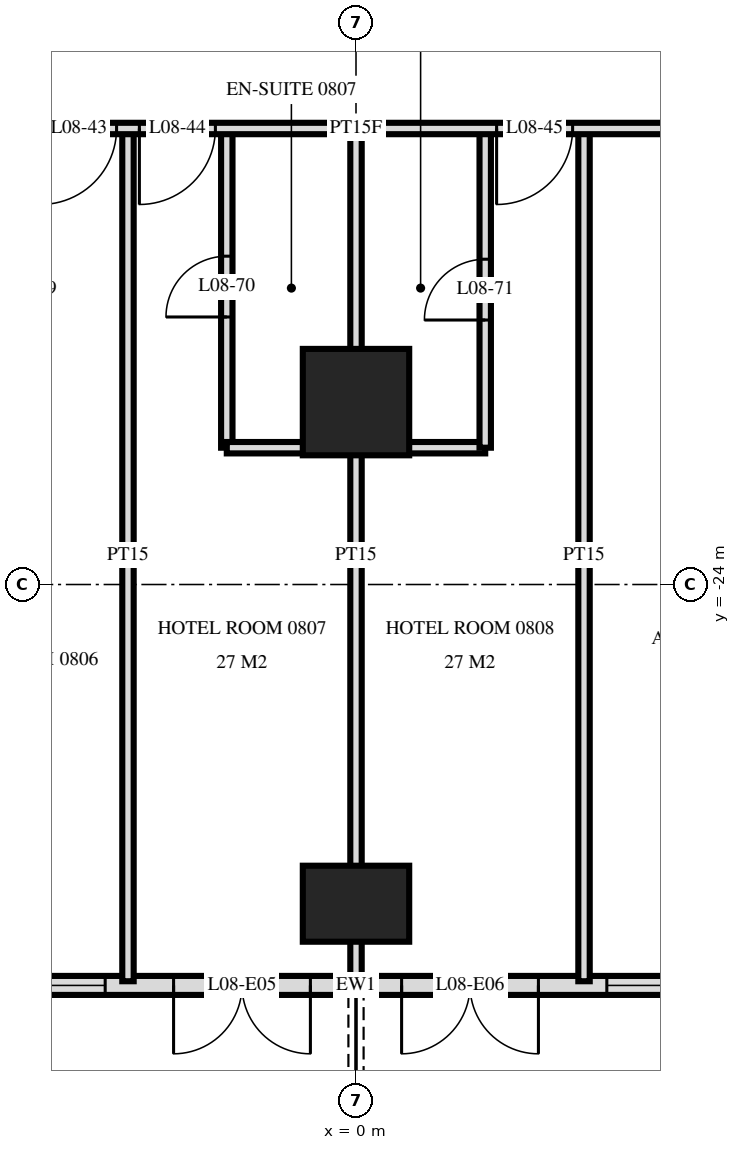
"""IFC4 building model, lengths in metres.
Left out: names, types, materials, properties, quantities, classifications, styles, units other than length and angle.
Written with IfcOpenShell. Run it as: python <this file> out.ifc"""

import sys

from ifc_helpers import new_model, si_unit, direction, frame, frame_2d, origin, origin_2d, place, context, subcontext, project, spatial, rectangle, extrude, element, fill, save


model = new_model("IFC4")
c1 = context("Model", 3, precision=1e-05, world=origin(), true_north=direction((0.0, 1.0)))
c2 = subcontext(c1, "Body", "Model", "MODEL_VIEW")
j1 = project(units=[si_unit("LENGTHUNIT", "METRE"), si_unit("PLANEANGLEUNIT", "RADIAN")], contexts=[c1])
p1 = place(None, origin())
s1 = spatial("IfcSite", under=j1, at=p1, CompositionType="ELEMENT")
p2 = place(p1, origin())
s2 = spatial("IfcBuilding", under=s1, at=p2, CompositionType="ELEMENT")
p3 = place(p2, frame((0.0, 0.0, 38.4)))
s3 = spatial("IfcBuildingStorey", under=s2, at=p3, CompositionType="ELEMENT", Elevation=38.4)
p4 = place(p3, frame((0.0, -28.2, 0.0), z_axis=(0.0, 0.0, 1.0), x_axis=(1.0, 0.0, 0.0)))
e1 = element("IfcColumn", 1, at=p4, inside=s3, PredefinedType="COLUMN", context=c2, shape_type="SweptSolid", body=[
    extrude(rectangle(XDim=1.4, YDim=1.0, at=origin_2d()), origin(), (0.0, 0.0, 1.0), 3.6),
])
p5 = place(p3, frame((0.0, -21.6, 0.0), z_axis=(0.0, 0.0, 1.0), x_axis=(1.0, 0.0, 0.0)))
e2 = element("IfcColumn", 2, at=p5, inside=s3, PredefinedType="COLUMN", context=c2, shape_type="SweptSolid", body=[
    extrude(rectangle(XDim=1.4, YDim=1.4, at=origin_2d()), origin(), (0.0, 0.0, 1.0), 3.6),
])
p6 = place(p3, frame((-28.775, -29.275, 0.0), z_axis=(0.0, 0.0, 1.0), x_axis=(1.0, 0.0, 0.0)))
e3 = element("IfcWall", 3, at=p6, inside=s3, PredefinedType="SOLIDWALL", context=c2, shape_type="SweptSolid", body=[
    extrude(rectangle(XDim=57.551, YDim=0.25, at=frame_2d((28.775, 0.0))), origin(), (0.0, 0.0, 1.0), 3.32),
])
p7 = place(p6, frame((0.575, 0.0, 0.0)))
e4 = element("IfcOpeningElement", 4, at=p7, cuts=e3, PredefinedType="OPENING", context=c2, shape_type="SweptSolid", body=[
    extrude(rectangle(XDim=1.8, YDim=2.4, at=frame_2d((0.9, 1.2))), frame((0.0, 0.135, 0.0), z_axis=(0.0, -1.0, 0.0), x_axis=(1.0, 0.0, 0.0)), (0.0, 0.0, 1.0), 0.27),
])
p8 = place(p6, frame((5.375, 0.0, 0.0)))
e5 = element("IfcOpeningElement", 5, at=p8, cuts=e3, PredefinedType="OPENING", context=c2, shape_type="SweptSolid", body=[
    extrude(rectangle(XDim=1.8, YDim=2.4, at=frame_2d((0.9, 1.2))), frame((0.0, 0.135, 0.0), z_axis=(0.0, -1.0, 0.0), x_axis=(1.0, 0.0, 0.0)), (0.0, 0.0, 1.0), 0.27),
])
p9 = place(p6, frame((8.075, 0.0, 0.3)))
e6 = element("IfcOpeningElement", 6, at=p9, cuts=e3, PredefinedType="OPENING", context=c2, shape_type="SweptSolid", body=[
    extrude(rectangle(XDim=2.4, YDim=2.1, at=frame_2d((1.2, 1.05))), frame((0.0, 0.135, 0.0), z_axis=(0.0, -1.0, 0.0), x_axis=(1.0, 0.0, 0.0)), (0.0, 0.0, 1.0), 0.27),
])
p10 = place(p6, frame((11.375, 0.0, 0.0)))
e7 = element("IfcOpeningElement", 7, at=p10, cuts=e3, PredefinedType="OPENING", context=c2, shape_type="SweptSolid", body=[
    extrude(rectangle(XDim=1.8, YDim=2.4, at=frame_2d((0.9, 1.2))), frame((0.0, 0.135, 0.0), z_axis=(0.0, -1.0, 0.0), x_axis=(1.0, 0.0, 0.0)), (0.0, 0.0, 1.0), 0.27),
])
p11 = place(p6, frame((14.075, 0.0, 0.3)))
e8 = element("IfcOpeningElement", 8, at=p11, cuts=e3, PredefinedType="OPENING", context=c2, shape_type="SweptSolid", body=[
    extrude(rectangle(XDim=2.4, YDim=2.1, at=frame_2d((1.2, 1.05))), frame((0.0, 0.135, 0.0), z_axis=(0.0, -1.0, 0.0), x_axis=(1.0, 0.0, 0.0)), (0.0, 0.0, 1.0), 0.27),
])
p12 = place(p6, frame((17.375, 0.0, 0.0)))
e9 = element("IfcOpeningElement", 9, at=p12, cuts=e3, PredefinedType="OPENING", context=c2, shape_type="SweptSolid", body=[
    extrude(rectangle(XDim=1.8, YDim=2.4, at=frame_2d((0.9, 1.2))), frame((0.0, 0.135, 0.0), z_axis=(0.0, -1.0, 0.0), x_axis=(1.0, 0.0, 0.0)), (0.0, 0.0, 1.0), 0.27),
])
p13 = place(p6, frame((20.075, 0.0, 0.3)))
e10 = element("IfcOpeningElement", 10, at=p13, cuts=e3, PredefinedType="OPENING", context=c2, shape_type="SweptSolid", body=[
    extrude(rectangle(XDim=2.4, YDim=2.1, at=frame_2d((1.2, 1.05))), frame((0.0, 0.135, 0.0), z_axis=(0.0, -1.0, 0.0), x_axis=(1.0, 0.0, 0.0)), (0.0, 0.0, 1.0), 0.27),
])
p14 = place(p6, frame((23.075, 0.0, 0.3)))
e11 = element("IfcOpeningElement", 11, at=p14, cuts=e3, PredefinedType="OPENING", context=c2, shape_type="SweptSolid", body=[
    extrude(rectangle(XDim=2.4, YDim=2.1, at=frame_2d((1.2, 1.05))), frame((0.0, 0.135, 0.0), z_axis=(0.0, -1.0, 0.0), x_axis=(1.0, 0.0, 0.0)), (0.0, 0.0, 1.0), 0.27),
])
p15 = place(p6, frame((26.375, 0.0, 0.0)))
e12 = element("IfcOpeningElement", 12, at=p15, cuts=e3, PredefinedType="OPENING", context=c2, shape_type="SweptSolid", body=[
    extrude(rectangle(XDim=1.8, YDim=2.4, at=frame_2d((0.9, 1.2))), frame((0.0, 0.135, 0.0), z_axis=(0.0, -1.0, 0.0), x_axis=(1.0, 0.0, 0.0)), (0.0, 0.0, 1.0), 0.27),
])
p16 = place(p6, frame((29.375, 0.0, 0.0)))
e13 = element("IfcOpeningElement", 13, at=p16, cuts=e3, PredefinedType="OPENING", context=c2, shape_type="SweptSolid", body=[
    extrude(rectangle(XDim=1.8, YDim=2.4, at=frame_2d((0.9, 1.2))), frame((0.0, 0.135, 0.0), z_axis=(0.0, -1.0, 0.0), x_axis=(1.0, 0.0, 0.0)), (0.0, 0.0, 1.0), 0.27),
])
p17 = place(p6, frame((32.075, 0.0, 0.3)))
e14 = element("IfcOpeningElement", 14, at=p17, cuts=e3, PredefinedType="OPENING", context=c2, shape_type="SweptSolid", body=[
    extrude(rectangle(XDim=2.4, YDim=2.1, at=frame_2d((1.2, 1.05))), frame((0.0, 0.135, 0.0), z_axis=(0.0, -1.0, 0.0), x_axis=(1.0, 0.0, 0.0)), (0.0, 0.0, 1.0), 0.27),
])
p18 = place(p6, frame((35.375, 0.0, 0.0)))
e15 = element("IfcOpeningElement", 15, at=p18, cuts=e3, PredefinedType="OPENING", context=c2, shape_type="SweptSolid", body=[
    extrude(rectangle(XDim=1.8, YDim=2.4, at=frame_2d((0.9, 1.2))), frame((0.0, 0.135, 0.0), z_axis=(0.0, -1.0, 0.0), x_axis=(1.0, 0.0, 0.0)), (0.0, 0.0, 1.0), 0.27),
])
p19 = place(p6, frame((38.075, 0.0, 0.3)))
e16 = element("IfcOpeningElement", 16, at=p19, cuts=e3, PredefinedType="OPENING", context=c2, shape_type="SweptSolid", body=[
    extrude(rectangle(XDim=2.4, YDim=2.1, at=frame_2d((1.2, 1.05))), frame((0.0, 0.135, 0.0), z_axis=(0.0, -1.0, 0.0), x_axis=(1.0, 0.0, 0.0)), (0.0, 0.0, 1.0), 0.27),
])
p20 = place(p6, frame((41.375, 0.0, 0.0)))
e17 = element("IfcOpeningElement", 17, at=p20, cuts=e3, PredefinedType="OPENING", context=c2, shape_type="SweptSolid", body=[
    extrude(rectangle(XDim=1.8, YDim=2.4, at=frame_2d((0.9, 1.2))), frame((0.0, 0.135, 0.0), z_axis=(0.0, -1.0, 0.0), x_axis=(1.0, 0.0, 0.0)), (0.0, 0.0, 1.0), 0.27),
])
p21 = place(p6, frame((44.075, 0.0, 0.3)))
e18 = element("IfcOpeningElement", 18, at=p21, cuts=e3, PredefinedType="OPENING", context=c2, shape_type="SweptSolid", body=[
    extrude(rectangle(XDim=2.4, YDim=2.1, at=frame_2d((1.2, 1.05))), frame((0.0, 0.135, 0.0), z_axis=(0.0, -1.0, 0.0), x_axis=(1.0, 0.0, 0.0)), (0.0, 0.0, 1.0), 0.27),
])
p22 = place(p6, frame((47.375, 0.0, 0.0)))
e19 = element("IfcOpeningElement", 19, at=p22, cuts=e3, PredefinedType="OPENING", context=c2, shape_type="SweptSolid", body=[
    extrude(rectangle(XDim=1.8, YDim=2.4, at=frame_2d((0.9, 1.2))), frame((0.0, 0.135, 0.0), z_axis=(0.0, -1.0, 0.0), x_axis=(1.0, 0.0, 0.0)), (0.0, 0.0, 1.0), 0.27),
])
p23 = place(p6, frame((50.075, 0.0, 0.3)))
e20 = element("IfcOpeningElement", 20, at=p23, cuts=e3, PredefinedType="OPENING", context=c2, shape_type="SweptSolid", body=[
    extrude(rectangle(XDim=2.4, YDim=2.1, at=frame_2d((1.2, 1.05))), frame((0.0, 0.135, 0.0), z_axis=(0.0, -1.0, 0.0), x_axis=(1.0, 0.0, 0.0)), (0.0, 0.0, 1.0), 0.27),
])
p24 = place(p6, frame((53.375, 0.0, 0.0)))
e21 = element("IfcOpeningElement", 21, at=p24, cuts=e3, PredefinedType="OPENING", context=c2, shape_type="SweptSolid", body=[
    extrude(rectangle(XDim=1.8, YDim=2.4, at=frame_2d((0.9, 1.2))), frame((0.0, 0.135, 0.0), z_axis=(0.0, -1.0, 0.0), x_axis=(1.0, 0.0, 0.0)), (0.0, 0.0, 1.0), 0.27),
])
p25 = place(p3, frame((3.0, -29.22, 0.0), z_axis=(0.0, 0.0, 1.0), x_axis=(0.0, 1.0, 0.0)))
e22 = element("IfcWall", 22, at=p25, inside=s3, PredefinedType="PARTITIONING", context=c2, shape_type="SweptSolid", body=[
    extrude(rectangle(XDim=11.22, YDim=0.15, at=frame_2d((5.61, 0.0))), origin(), (0.0, 0.0, 1.0), 3.32),
])
p26 = place(p3, frame((1.7, -22.2, 0.0), z_axis=(0.0, 0.0, 1.0), x_axis=(0.0, 1.0, 0.0)))
e23 = element("IfcWall", 23, at=p26, inside=s3, PredefinedType="PARTITIONING", context=c2, shape_type="SweptSolid", body=[
    extrude(rectangle(XDim=4.2, YDim=0.15, at=frame_2d((2.1, 0.0))), origin(), (0.0, 0.0, 1.0), 3.32),
])
p27 = place(p26, frame((1.68, 0.0, 0.0)))
e24 = element("IfcOpeningElement", 24, at=p27, cuts=e23, PredefinedType="OPENING", context=c2, shape_type="SweptSolid", body=[
    extrude(rectangle(XDim=0.8, YDim=2.1, at=frame_2d((0.4, 1.05))), frame((0.0, 0.085, 0.0), z_axis=(0.0, -1.0, 0.0), x_axis=(1.0, 0.0, 0.0)), (0.0, 0.0, 1.0), 0.17),
])
p28 = place(p3, frame((0.0, -29.22, 0.0), z_axis=(0.0, 0.0, 1.0), x_axis=(0.0, 1.0, 0.0)))
e25 = element("IfcWall", 25, at=p28, inside=s3, PredefinedType="PARTITIONING", context=c2, shape_type="SweptSolid", body=[
    extrude(rectangle(XDim=11.22, YDim=0.15, at=frame_2d((5.61, 0.0))), origin(), (0.0, 0.0, 1.0), 3.32),
])
p29 = place(p3, frame((-1.7, -22.2, 0.0), z_axis=(0.0, 0.0, 1.0), x_axis=(0.0, 1.0, 0.0)))
e26 = element("IfcWall", 26, at=p29, inside=s3, PredefinedType="PARTITIONING", context=c2, shape_type="SweptSolid", body=[
    extrude(rectangle(XDim=4.2, YDim=0.15, at=frame_2d((2.1, 0.0))), origin(), (0.0, 0.0, 1.0), 3.32),
])
p30 = place(p29, frame((1.72, 0.0, 0.0)))
e27 = element("IfcOpeningElement", 27, at=p30, cuts=e26, PredefinedType="OPENING", context=c2, shape_type="SweptSolid", body=[
    extrude(rectangle(XDim=0.8, YDim=2.1, at=frame_2d((0.4, 1.05))), frame((0.0, 0.085, 0.0), z_axis=(0.0, -1.0, 0.0), x_axis=(1.0, 0.0, 0.0)), (0.0, 0.0, 1.0), 0.17),
])
p31 = place(p3, frame((-3.0, -29.22, 0.0), z_axis=(0.0, 0.0, 1.0), x_axis=(0.0, 1.0, 0.0)))
e28 = element("IfcWall", 28, at=p31, inside=s3, PredefinedType="PARTITIONING", context=c2, shape_type="SweptSolid", body=[
    extrude(rectangle(XDim=11.22, YDim=0.15, at=frame_2d((5.61, 0.0))), origin(), (0.0, 0.0, 1.0), 3.32),
])
p32 = place(p3, frame((-1.7, -22.2, 0.0), z_axis=(0.0, 0.0, 1.0), x_axis=(1.0, 0.0, 0.0)))
e29 = element("IfcWall", 29, at=p32, inside=s3, PredefinedType="PARTITIONING", context=c2, shape_type="SweptSolid", body=[
    extrude(rectangle(XDim=3.4, YDim=0.15, at=frame_2d((1.7, 0.0))), origin(), (0.0, 0.0, 1.0), 3.32),
])
p33 = place(p3, frame((-33.12, -18.0, 0.0), z_axis=(0.0, 0.0, 1.0), x_axis=(1.0, 0.0, 0.0)))
e30 = element("IfcWall", 30, at=p33, inside=s3, PredefinedType="PARTITIONING", context=c2, shape_type="SweptSolid", body=[
    extrude(rectangle(XDim=66.24, YDim=0.15, at=frame_2d((33.12, 0.0))), origin(), (0.0, 0.0, 1.0), 3.32),
])
p34 = place(p33, frame((12.27, 0.0, 0.0)))
e31 = element("IfcOpeningElement", 31, at=p34, cuts=e30, PredefinedType="OPENING", context=c2, shape_type="SweptSolid", body=[
    extrude(rectangle(XDim=1.0, YDim=2.1, at=frame_2d((0.5, 1.05))), frame((0.0, 0.085, 0.0), z_axis=(0.0, -1.0, 0.0), x_axis=(1.0, 0.0, 0.0)), (0.0, 0.0, 1.0), 0.17),
])
p35 = place(p33, frame((16.97, 0.0, 0.0)))
e32 = element("IfcOpeningElement", 32, at=p35, cuts=e30, PredefinedType="OPENING", context=c2, shape_type="SweptSolid", body=[
    extrude(rectangle(XDim=1.0, YDim=2.1, at=frame_2d((0.5, 1.05))), frame((0.0, 0.085, 0.0), z_axis=(0.0, -1.0, 0.0), x_axis=(1.0, 0.0, 0.0)), (0.0, 0.0, 1.0), 0.17),
])
p36 = place(p33, frame((18.27, 0.0, 0.0)))
e33 = element("IfcOpeningElement", 33, at=p36, cuts=e30, PredefinedType="OPENING", context=c2, shape_type="SweptSolid", body=[
    extrude(rectangle(XDim=1.0, YDim=2.1, at=frame_2d((0.5, 1.05))), frame((0.0, 0.085, 0.0), z_axis=(0.0, -1.0, 0.0), x_axis=(1.0, 0.0, 0.0)), (0.0, 0.0, 1.0), 0.17),
])
p37 = place(p33, frame((22.97, 0.0, 0.0)))
e34 = element("IfcOpeningElement", 34, at=p37, cuts=e30, PredefinedType="OPENING", context=c2, shape_type="SweptSolid", body=[
    extrude(rectangle(XDim=1.0, YDim=2.1, at=frame_2d((0.5, 1.05))), frame((0.0, 0.085, 0.0), z_axis=(0.0, -1.0, 0.0), x_axis=(1.0, 0.0, 0.0)), (0.0, 0.0, 1.0), 0.17),
])
p38 = place(p33, frame((24.27, 0.0, 0.0)))
e35 = element("IfcOpeningElement", 35, at=p38, cuts=e30, PredefinedType="OPENING", context=c2, shape_type="SweptSolid", body=[
    extrude(rectangle(XDim=1.0, YDim=2.1, at=frame_2d((0.5, 1.05))), frame((0.0, 0.085, 0.0), z_axis=(0.0, -1.0, 0.0), x_axis=(1.0, 0.0, 0.0)), (0.0, 0.0, 1.0), 0.17),
])
p39 = place(p33, frame((28.97, 0.0, 0.0)))
e36 = element("IfcOpeningElement", 36, at=p39, cuts=e30, PredefinedType="OPENING", context=c2, shape_type="SweptSolid", body=[
    extrude(rectangle(XDim=1.0, YDim=2.1, at=frame_2d((0.5, 1.05))), frame((0.0, 0.085, 0.0), z_axis=(0.0, -1.0, 0.0), x_axis=(1.0, 0.0, 0.0)), (0.0, 0.0, 1.0), 0.17),
])
p40 = place(p33, frame((30.27, 0.0, 0.0)))
e37 = element("IfcOpeningElement", 37, at=p40, cuts=e30, PredefinedType="OPENING", context=c2, shape_type="SweptSolid", body=[
    extrude(rectangle(XDim=1.0, YDim=2.1, at=frame_2d((0.5, 1.05))), frame((0.0, 0.085, 0.0), z_axis=(0.0, -1.0, 0.0), x_axis=(1.0, 0.0, 0.0)), (0.0, 0.0, 1.0), 0.17),
])
p41 = place(p33, frame((34.97, 0.0, 0.0)))
e38 = element("IfcOpeningElement", 38, at=p41, cuts=e30, PredefinedType="OPENING", context=c2, shape_type="SweptSolid", body=[
    extrude(rectangle(XDim=1.0, YDim=2.1, at=frame_2d((0.5, 1.05))), frame((0.0, 0.085, 0.0), z_axis=(0.0, -1.0, 0.0), x_axis=(1.0, 0.0, 0.0)), (0.0, 0.0, 1.0), 0.17),
])
p42 = place(p33, frame((37.27, 0.0, 0.0)))
e39 = element("IfcOpeningElement", 39, at=p42, cuts=e30, PredefinedType="OPENING", context=c2, shape_type="SweptSolid", body=[
    extrude(rectangle(XDim=1.0, YDim=2.1, at=frame_2d((0.5, 1.05))), frame((0.0, 0.085, 0.0), z_axis=(0.0, -1.0, 0.0), x_axis=(1.0, 0.0, 0.0)), (0.0, 0.0, 1.0), 0.17),
])
p43 = place(p33, frame((43.97, 0.0, 0.0)))
e40 = element("IfcOpeningElement", 40, at=p43, cuts=e30, PredefinedType="OPENING", context=c2, shape_type="SweptSolid", body=[
    extrude(rectangle(XDim=1.0, YDim=2.1, at=frame_2d((0.5, 1.05))), frame((0.0, 0.085, 0.0), z_axis=(0.0, -1.0, 0.0), x_axis=(1.0, 0.0, 0.0)), (0.0, 0.0, 1.0), 0.17),
])
p44 = place(p33, frame((45.27, 0.0, 0.0)))
e41 = element("IfcOpeningElement", 41, at=p44, cuts=e30, PredefinedType="OPENING", context=c2, shape_type="SweptSolid", body=[
    extrude(rectangle(XDim=1.0, YDim=2.1, at=frame_2d((0.5, 1.05))), frame((0.0, 0.085, 0.0), z_axis=(0.0, -1.0, 0.0), x_axis=(1.0, 0.0, 0.0)), (0.0, 0.0, 1.0), 0.17),
])
p45 = place(p33, frame((51.22, 0.0, 0.0)))
e42 = element("IfcOpeningElement", 42, at=p45, cuts=e30, PredefinedType="OPENING", context=c2, shape_type="SweptSolid", body=[
    extrude(rectangle(XDim=1.0, YDim=2.1, at=frame_2d((0.5, 1.05))), frame((0.0, 0.085, 0.0), z_axis=(0.0, -1.0, 0.0), x_axis=(1.0, 0.0, 0.0)), (0.0, 0.0, 1.0), 0.17),
])
p46 = place(p33, frame((54.27, 0.0, 0.0)))
e43 = element("IfcOpeningElement", 43, at=p46, cuts=e30, PredefinedType="OPENING", context=c2, shape_type="SweptSolid", body=[
    extrude(rectangle(XDim=1.0, YDim=2.1, at=frame_2d((0.5, 1.05))), frame((0.0, 0.085, 0.0), z_axis=(0.0, -1.0, 0.0), x_axis=(1.0, 0.0, 0.0)), (0.0, 0.0, 1.0), 0.17),
])
p47 = place(p33, frame((6.07, 0.0, 0.0)))
e44 = element("IfcOpeningElement", 44, at=p47, cuts=e30, PredefinedType="OPENING", context=c2, shape_type="SweptSolid", body=[
    extrude(rectangle(XDim=1.0, YDim=2.1, at=frame_2d((0.5, 1.05))), frame((0.0, 0.085, 0.0), z_axis=(0.0, -1.0, 0.0), x_axis=(1.0, 0.0, 0.0)), (0.0, 0.0, 1.0), 0.17),
])
p48 = place(p33, frame((63.37, 0.0, 0.0)))
e45 = element("IfcOpeningElement", 45, at=p48, cuts=e30, PredefinedType="OPENING", context=c2, shape_type="SweptSolid", body=[
    extrude(rectangle(XDim=1.0, YDim=2.1, at=frame_2d((0.5, 1.05))), frame((0.0, 0.085, 0.0), z_axis=(0.0, -1.0, 0.0), x_axis=(1.0, 0.0, 0.0)), (0.0, 0.0, 1.0), 0.17),
])
p49 = place(p14, origin())
e46 = element("IfcWindow", 46, at=p49, inside=s3, PartitioningType="SINGLE_PANEL", PredefinedType="WINDOW", context=c2, shape_type="SweptSolid", body=[
    extrude(rectangle(XDim=2.4, YDim=2.1, at=frame_2d((1.2, 1.05))), frame((0.0, 0.03, 0.0), z_axis=(0.0, -1.0, 0.0), x_axis=(1.0, 0.0, 0.0)), (0.0, 0.0, 1.0), 0.06),
])
fill(e11, e46)
p50 = place(p15, frame((0.9, 0.0, 0.0), z_axis=(0.0, 0.0, 1.0), x_axis=(-1.0, 0.0, 0.0)))
e47 = element("IfcDoor", 47, at=p50, inside=s3, OperationType="DOUBLE_DOOR_SINGLE_SWING", PredefinedType="DOOR", context=c2, shape_type="SweptSolid", body=[
    extrude(rectangle(XDim=1.8, YDim=2.4, at=frame_2d((0.0, 1.2))), frame((0.0, -0.025, 0.0), z_axis=(0.0, 1.0, 0.0), x_axis=(-1.0, 0.0, 0.0)), (0.0, 0.0, 1.0), 0.05),
])
fill(e12, e47)
p51 = place(p16, frame((0.9, 0.0, 0.0), z_axis=(0.0, 0.0, 1.0), x_axis=(-1.0, 0.0, 0.0)))
e48 = element("IfcDoor", 48, at=p51, inside=s3, OperationType="DOUBLE_DOOR_SINGLE_SWING", PredefinedType="DOOR", context=c2, shape_type="SweptSolid", body=[
    extrude(rectangle(XDim=1.8, YDim=2.4, at=frame_2d((0.0, 1.2))), frame((0.0, -0.025, 0.0), z_axis=(0.0, 1.0, 0.0), x_axis=(-1.0, 0.0, 0.0)), (0.0, 0.0, 1.0), 0.05),
])
fill(e13, e48)
p52 = place(p17, origin())
e49 = element("IfcWindow", 49, at=p52, inside=s3, PartitioningType="SINGLE_PANEL", PredefinedType="WINDOW", context=c2, shape_type="SweptSolid", body=[
    extrude(rectangle(XDim=2.4, YDim=2.1, at=frame_2d((1.2, 1.05))), frame((0.0, 0.03, 0.0), z_axis=(0.0, -1.0, 0.0), x_axis=(1.0, 0.0, 0.0)), (0.0, 0.0, 1.0), 0.06),
])
fill(e14, e49)
p53 = place(p39, frame((0.5, 0.0, 0.0), z_axis=(0.0, 0.0, 1.0), x_axis=(-1.0, 0.0, 0.0)))
e50 = element("IfcDoor", 50, at=p53, inside=s3, OperationType="SINGLE_SWING_LEFT", PredefinedType="DOOR", context=c2, shape_type="SweptSolid", body=[
    extrude(rectangle(XDim=1.0, YDim=2.1, at=frame_2d((0.0, 1.05))), frame((0.0, -0.025, 0.0), z_axis=(0.0, 1.0, 0.0), x_axis=(-1.0, 0.0, 0.0)), (0.0, 0.0, 1.0), 0.05),
])
fill(e36, e50)
p54 = place(p40, frame((0.5, 0.0, 0.0), z_axis=(0.0, 0.0, 1.0), x_axis=(-1.0, 0.0, 0.0)))
e51 = element("IfcDoor", 51, at=p54, inside=s3, OperationType="SINGLE_SWING_LEFT", PredefinedType="DOOR", context=c2, shape_type="SweptSolid", body=[
    extrude(rectangle(XDim=1.0, YDim=2.1, at=frame_2d((0.0, 1.05))), frame((0.0, -0.025, 0.0), z_axis=(0.0, 1.0, 0.0), x_axis=(-1.0, 0.0, 0.0)), (0.0, 0.0, 1.0), 0.05),
])
fill(e37, e51)
p55 = place(p41, frame((0.5, 0.0, 0.0), z_axis=(0.0, 0.0, 1.0), x_axis=(-1.0, 0.0, 0.0)))
e52 = element("IfcDoor", 52, at=p55, inside=s3, OperationType="SINGLE_SWING_LEFT", PredefinedType="DOOR", context=c2, shape_type="SweptSolid", body=[
    extrude(rectangle(XDim=1.0, YDim=2.1, at=frame_2d((0.0, 1.05))), frame((0.0, -0.025, 0.0), z_axis=(0.0, 1.0, 0.0), x_axis=(-1.0, 0.0, 0.0)), (0.0, 0.0, 1.0), 0.05),
])
fill(e38, e52)
p56 = place(p30, origin())
e53 = element("IfcDoor", 53, at=p56, inside=s3, OperationType="SINGLE_SWING_RIGHT", PredefinedType="DOOR", context=c2, shape_type="SweptSolid", body=[
    extrude(rectangle(XDim=0.8, YDim=2.1, at=frame_2d((0.4, 1.05))), frame((0.0, 0.025, 0.0), z_axis=(0.0, -1.0, 0.0), x_axis=(1.0, 0.0, 0.0)), (0.0, 0.0, 1.0), 0.05),
])
fill(e27, e53)
p57 = place(p27, origin())
e54 = element("IfcDoor", 54, at=p57, inside=s3, OperationType="SINGLE_SWING_RIGHT", PredefinedType="DOOR", context=c2, shape_type="SweptSolid", body=[
    extrude(rectangle(XDim=0.8, YDim=2.1, at=frame_2d((0.4, 1.05))), frame((0.0, 0.025, 0.0), z_axis=(0.0, -1.0, 0.0), x_axis=(1.0, 0.0, 0.0)), (0.0, 0.0, 1.0), 0.05),
])
fill(e24, e54)
save(model, sys.argv[1])
